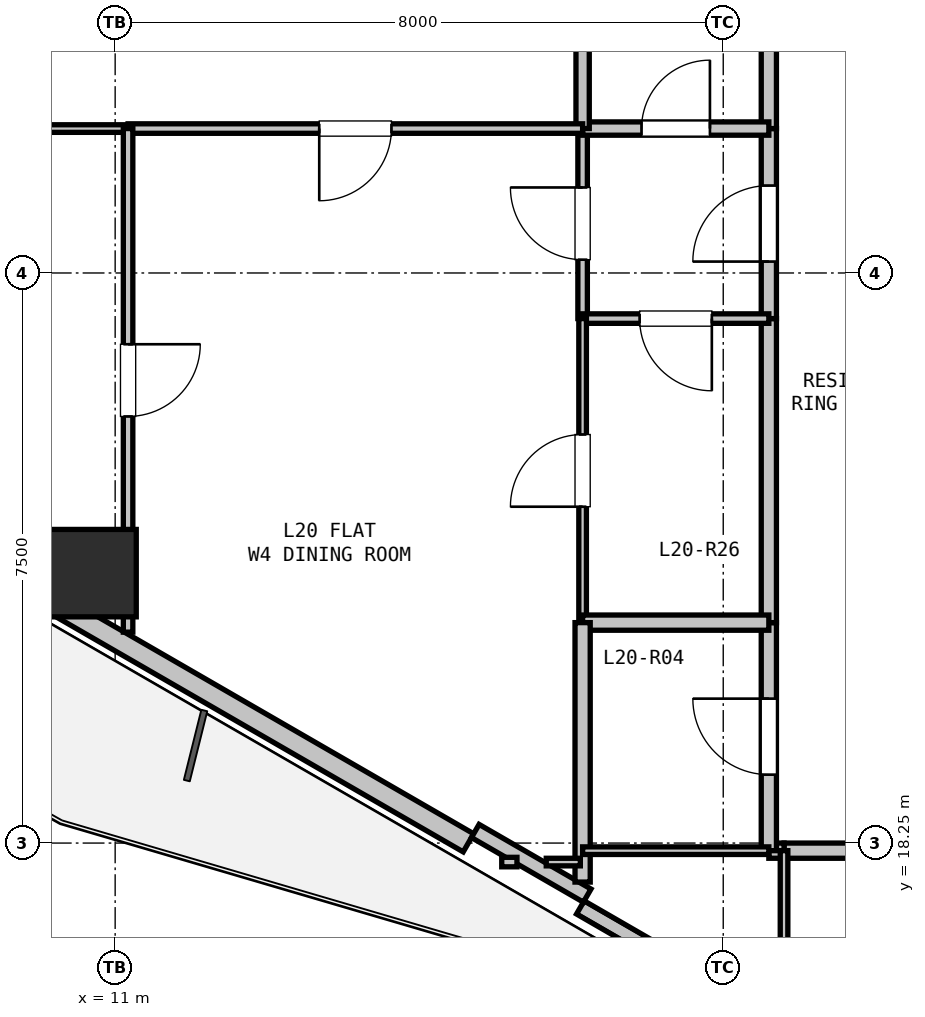
"""IFC4 building model, lengths in metres.
Left out: names, types, materials, properties, quantities, classifications, styles, units other than length and angle.
Written with IfcOpenShell. Run it as: python <this file> out.ifc"""

import sys

from ifc_helpers import new_model, si_unit, direction, frame, frame_2d, origin, origin_2d, place, context, subcontext, project, spatial, rectangle, hollow_rectangle, extrude, element, fill, save


model = new_model("IFC4")
c1 = context("Model", 3, precision=1e-05, world=origin(), true_north=direction((0.0, 1.0)))
c2 = subcontext(c1, "Body", "Model", "MODEL_VIEW")
j1 = project(units=[si_unit("LENGTHUNIT", "METRE"), si_unit("PLANEANGLEUNIT", "RADIAN")], contexts=[c1])
p1 = place(None, origin())
s1 = spatial("IfcSite", under=j1, at=p1, CompositionType="ELEMENT")
p2 = place(p1, origin())
s2 = spatial("IfcBuilding", under=s1, at=p2, CompositionType="ELEMENT")
p3 = place(p2, frame((0.0, 0.0, 76.8)))
s3 = spatial("IfcBuildingStorey", under=s2, at=p3, CompositionType="ELEMENT", Elevation=76.8)
p4 = place(p3, frame((10.702, 21.801, 0.0), z_axis=(0.0, 0.0, 1.0), x_axis=(1.0, 0.0, 0.0)))
e1 = element("IfcColumn", 1, at=p4, inside=s3, PredefinedType="COLUMN", context=c2, shape_type="SweptSolid", body=[
    extrude(hollow_rectangle(XDim=1.15, YDim=1.15, WallThickness=0.032, at=origin_2d()), origin(), (0.0, 0.0, 1.0), 3.3),
])
p5 = place(p3, frame((26.845, 11.788, 0.0), z_axis=(0.0, 0.0, 1.0), x_axis=(-0.866027010039, 0.499997217876, 0.0)))
e2 = element("IfcWall", 2, at=p5, inside=s3, PredefinedType="PARAPET", context=c2, shape_type="SweptSolid", body=[
    extrude(rectangle(XDim=11.229, YDim=0.2, at=frame_2d((5.615, 0.0))), origin(), (0.0, 0.0, 1.0), 0.2),
])
p6 = place(p3, frame((15.648, 18.253, 0.0), z_axis=(0.0, 0.0, 1.0), x_axis=(-0.866023023012, 0.500004123596, 0.0)))
e3 = element("IfcWall", 3, at=p6, inside=s3, PredefinedType="SOLIDWALL", context=c2, shape_type="SweptSolid", body=[
    extrude(rectangle(XDim=11.93, YDim=0.275, at=frame_2d((5.965, 0.0))), origin(), (0.0, 0.0, 1.0), 2.67),
])
p7 = place(p6, frame((8.021, 0.0, 0.9)))
e4 = element("IfcOpeningElement", 4, at=p7, cuts=e3, PredefinedType="OPENING", context=c2, shape_type="SweptSolid", body=[
    extrude(rectangle(XDim=1.2, YDim=1.4, at=frame_2d((0.6, 0.7))), frame((0.0, 0.147, 0.0), z_axis=(0.0, -1.0, 0.0), x_axis=(1.0, 0.0, 0.0)), (0.0, 0.0, 1.0), 0.295),
])
p8 = place(p3, frame((17.21, 17.559, 0.0), z_axis=(0.0, 0.0, 1.0), x_axis=(-0.866025371046, 0.500000056704, 0.0)))
e5 = element("IfcWall", 5, at=p8, inside=s3, PredefinedType="PARAPET", context=c2, shape_type="SweptSolid", body=[
    extrude(rectangle(XDim=1.7, YDim=0.2, at=frame_2d((0.85, 0.0))), origin(), (0.0, 0.0, 1.0), 2.67),
])
p9 = place(p3, frame((22.6, 18.15, 0.0), z_axis=(0.0, 0.0, 1.0), x_axis=(-1.0, 0.0, 0.0)))
e6 = element("IfcWall", 6, at=p9, inside=s3, PredefinedType="PARTITIONING", context=c2, shape_type="SweptSolid", body=[
    extrude(rectangle(XDim=2.8, YDim=0.2, at=frame_2d((1.4, 0.0))), origin(), (0.0, 0.0, 1.0), 3.05),
])
p10 = place(p9, frame((0.9, 0.0, 0.0)))
e7 = element("IfcOpeningElement", 7, at=p10, cuts=e6, PredefinedType="OPENING", context=c2, shape_type="SweptSolid", body=[
    extrude(rectangle(XDim=1.0, YDim=2.15, at=frame_2d((0.5, 1.075))), frame((0.0, 0.11, 0.0), z_axis=(0.0, -1.0, 0.0), x_axis=(1.0, 0.0, 0.0)), (0.0, 0.0, 1.0), 0.22),
])
p11 = place(p3, frame((19.8, 18.15, 0.0), z_axis=(0.0, 0.0, 1.0), x_axis=(-1.0, 0.0, 0.0)))
e8 = element("IfcWall", 8, at=p11, inside=s3, PredefinedType="PARTITIONING", context=c2, shape_type="SweptSolid", body=[
    extrude(rectangle(XDim=0.2, YDim=0.2, at=frame_2d((0.1, 0.0))), origin(), (0.0, 0.0, 1.0), 3.05),
])
p12 = place(p3, frame((19.6, 18.15, 0.0), z_axis=(0.0, 0.0, 1.0), x_axis=(0.0, 1.0, 0.0)))
e9 = element("IfcWall", 9, at=p12, inside=s3, PredefinedType="PARTITIONING", context=c2, shape_type="SweptSolid", body=[
    extrude(rectangle(XDim=3.0, YDim=0.2, at=frame_2d((1.5, 0.0))), origin(), (0.0, 0.0, 1.0), 2.423),
])
p13 = place(p12, frame((1.0, 0.0, 0.0)))
e10 = element("IfcOpeningElement", 10, at=p13, cuts=e9, PredefinedType="OPENING", context=c2, shape_type="SweptSolid", body=[
    extrude(rectangle(XDim=1.0, YDim=2.15, at=frame_2d((0.5, 1.075))), frame((0.0, 0.11, 0.0), z_axis=(0.0, -1.0, 0.0), x_axis=(1.0, 0.0, 0.0)), (0.0, 0.0, 1.0), 0.22),
])
p14 = place(p3, frame((19.6, 21.15, 0.0), z_axis=(0.0, 0.0, 1.0), x_axis=(0.0, 1.0, 0.0)))
e11 = element("IfcWall", 11, at=p14, inside=s3, PredefinedType="PARTITIONING", context=c2, shape_type="SweptSolid", body=[
    extrude(rectangle(XDim=4.0, YDim=0.2, at=frame_2d((2.0, 0.0))), origin(), (0.0, 0.0, 1.0), 2.423),
])
p15 = place(p3, frame((19.6, 25.15, 0.0), z_axis=(0.0, 0.0, 1.0), x_axis=(0.0, 1.0, 0.0)))
e12 = element("IfcWall", 12, at=p15, inside=s3, PredefinedType="PARTITIONING", context=c2, shape_type="SweptSolid", body=[
    extrude(rectangle(XDim=2.5, YDim=0.2, at=frame_2d((1.25, 0.0))), origin(), (0.0, 0.0, 1.0), 3.05),
])
p16 = place(p15, frame((0.75, 0.0, 0.0)))
e13 = element("IfcOpeningElement", 13, at=p16, cuts=e12, PredefinedType="OPENING", context=c2, shape_type="SweptSolid", body=[
    extrude(rectangle(XDim=1.0, YDim=2.15, at=frame_2d((0.5, 1.075))), frame((0.0, 0.11, 0.0), z_axis=(0.0, -1.0, 0.0), x_axis=(1.0, 0.0, 0.0)), (0.0, 0.0, 1.0), 0.22),
])
p17 = place(p3, frame((19.6, 27.65, 0.0), z_axis=(0.0, 0.0, 1.0), x_axis=(0.0, 1.0, 0.0)))
e14 = element("IfcWall", 14, at=p17, inside=s3, PredefinedType="PARTITIONING", context=c2, shape_type="SweptSolid", body=[
    extrude(rectangle(XDim=2.1, YDim=0.2, at=frame_2d((1.05, 0.0))), origin(), (0.0, 0.0, 1.0), 3.05),
])
p18 = place(p3, frame((17.15, 25.15, 0.0), z_axis=(0.0, 0.0, 1.0), x_axis=(0.0, 1.0, 0.0)))
e15 = element("IfcWall", 15, at=p18, inside=s3, PredefinedType="PARTITIONING", context=c2, shape_type="SweptSolid", body=[
    extrude(rectangle(XDim=2.5, YDim=0.125, at=frame_2d((1.25, 0.0))), origin(), (0.0, 0.0, 1.0), 3.05),
])
p19 = place(p18, frame((0.775, 0.0, 0.0)))
e16 = element("IfcOpeningElement", 16, at=p19, cuts=e15, PredefinedType="OPENING", context=c2, shape_type="SweptSolid", body=[
    extrude(rectangle(XDim=0.95, YDim=2.1, at=frame_2d((0.475, 1.05))), frame((0.0, 0.073, 0.0), z_axis=(0.0, -1.0, 0.0), x_axis=(1.0, 0.0, 0.0)), (0.0, 0.0, 1.0), 0.145),
])
p20 = place(p3, frame((17.15, 27.65, 0.0), z_axis=(0.0, 0.0, 1.0), x_axis=(1.0, 0.0, 0.0)))
e17 = element("IfcWall", 17, at=p20, inside=s3, PredefinedType="PLUMBINGWALL", context=c2, shape_type="SweptSolid", body=[
    extrude(rectangle(XDim=2.45, YDim=0.175, at=frame_2d((1.225, 0.0))), origin(), (0.0, 0.0, 1.0), 3.05),
])
p21 = place(p20, frame((0.775, 0.0, 0.0)))
e18 = element("IfcOpeningElement", 18, at=p21, cuts=e17, PredefinedType="OPENING", context=c2, shape_type="SweptSolid", body=[
    extrude(rectangle(XDim=0.9, YDim=2.1, at=frame_2d((0.45, 1.05))), frame((0.0, 0.097, 0.0), z_axis=(0.0, -1.0, 0.0), x_axis=(1.0, 0.0, 0.0)), (0.0, 0.0, 1.0), 0.195),
])
p22 = place(p3, frame((19.6, 25.15, 0.0), z_axis=(0.0, 0.0, 1.0), x_axis=(-1.0, 0.0, 0.0)))
e19 = element("IfcWall", 19, at=p22, inside=s3, PredefinedType="PARTITIONING", context=c2, shape_type="SweptSolid", body=[
    extrude(rectangle(XDim=2.45, YDim=0.125, at=frame_2d((1.225, 0.0))), origin(), (0.0, 0.0, 1.0), 3.05),
])
p23 = place(p22, frame((0.75, 0.0, 0.0)))
e20 = element("IfcOpeningElement", 20, at=p23, cuts=e19, PredefinedType="OPENING", context=c2, shape_type="SweptSolid", body=[
    extrude(rectangle(XDim=0.95, YDim=2.1, at=frame_2d((0.475, 1.05))), frame((0.0, 0.073, 0.0), z_axis=(0.0, -1.0, 0.0), x_axis=(1.0, 0.0, 0.0)), (0.0, 0.0, 1.0), 0.145),
])
p24 = place(p3, frame((17.15, 27.65, 0.0), z_axis=(0.0, 0.0, 1.0), x_axis=(0.0, 1.0, 0.0)))
e21 = element("IfcWall", 21, at=p24, inside=s3, PredefinedType="PLUMBINGWALL", context=c2, shape_type="SweptSolid", body=[
    extrude(rectangle(XDim=2.1, YDim=0.175, at=frame_2d((1.05, 0.0))), origin(), (0.0, 0.0, 1.0), 3.05),
])
p25 = place(p3, frame((17.15, 21.15, 0.0), z_axis=(0.0, 0.0, 1.0), x_axis=(0.0, 1.0, 0.0)))
e22 = element("IfcWall", 22, at=p25, inside=s3, PredefinedType="PARTITIONING", context=c2, shape_type="SweptSolid", body=[
    extrude(rectangle(XDim=4.0, YDim=0.1, at=frame_2d((2.0, 0.0))), origin(), (0.0, 0.0, 1.0), 2.423),
])
p26 = place(p25, frame((1.525, 0.0, 0.0)))
e23 = element("IfcOpeningElement", 23, at=p26, cuts=e22, PredefinedType="OPENING", context=c2, shape_type="SweptSolid", body=[
    extrude(rectangle(XDim=0.95, YDim=2.1, at=frame_2d((0.475, 1.05))), frame((0.0, 0.06, 0.0), z_axis=(0.0, -1.0, 0.0), x_axis=(1.0, 0.0, 0.0)), (0.0, 0.0, 1.0), 0.12),
])
p27 = place(p3, frame((19.6, 21.15, 0.0), z_axis=(0.0, 0.0, 1.0), x_axis=(-1.0, 0.0, 0.0)))
e24 = element("IfcWall", 24, at=p27, inside=s3, PredefinedType="PARTITIONING", context=c2, shape_type="SweptSolid", body=[
    extrude(rectangle(XDim=2.45, YDim=0.2, at=frame_2d((1.225, 0.0))), origin(), (0.0, 0.0, 1.0), 2.423),
])
p28 = place(p3, frame((17.15, 17.737, 0.0), z_axis=(0.0, 0.0, 1.0), x_axis=(0.0, 1.0, 0.0)))
e25 = element("IfcWall", 25, at=p28, inside=s3, PredefinedType="PARTITIONING", context=c2, shape_type="SweptSolid", body=[
    extrude(rectangle(XDim=3.413, YDim=0.2, at=frame_2d((1.707, 0.0))), origin(), (0.0, 0.0, 1.0), 2.365),
])
p29 = place(p3, frame((19.6, 18.15, 0.0), z_axis=(0.0, 0.0, 1.0), x_axis=(-1.0, 0.0, 0.0)))
e26 = element("IfcWall", 26, at=p29, inside=s3, PredefinedType="PARTITIONING", context=c2, shape_type="SweptSolid", body=[
    extrude(rectangle(XDim=2.45, YDim=0.1, at=frame_2d((1.225, 0.0))), origin(), (0.0, 0.0, 1.0), 2.365),
])
p30 = place(p3, frame((19.8, 15.897, 0.0), z_axis=(0.0, 0.0, 1.0), x_axis=(0.0, 1.0, 0.0)))
e27 = element("IfcWall", 27, at=p30, inside=s3, PredefinedType="PARTITIONING", context=c2, shape_type="SweptSolid", body=[
    extrude(rectangle(XDim=2.252, YDim=0.1, at=frame_2d((1.126, 0.0))), origin(), (0.0, 0.0, 1.0), 2.365),
])
p31 = place(p3, frame((17.15, 27.65, 0.0), z_axis=(0.0, 0.0, 1.0), x_axis=(-1.0, 0.0, 0.0)))
e28 = element("IfcWall", 28, at=p31, inside=s3, PredefinedType="PARTITIONING", context=c2, shape_type="SweptSolid", body=[
    extrude(rectangle(XDim=5.98, YDim=0.125, at=frame_2d((2.99, 0.0))), origin(), (0.0, 0.0, 1.0), 3.05),
])
p32 = place(p31, frame((2.515, 0.0, 0.0)))
e29 = element("IfcOpeningElement", 29, at=p32, cuts=e28, PredefinedType="OPENING", context=c2, shape_type="SweptSolid", body=[
    extrude(rectangle(XDim=0.95, YDim=2.1, at=frame_2d((0.475, 1.05))), frame((0.0, 0.073, 0.0), z_axis=(0.0, -1.0, 0.0), x_axis=(1.0, 0.0, 0.0)), (0.0, 0.0, 1.0), 0.145),
])
p33 = place(p3, frame((11.17, 27.65, 0.0), z_axis=(0.0, 0.0, 1.0), x_axis=(-1.0, 0.0, 0.0)))
e30 = element("IfcWall", 30, at=p33, inside=s3, PredefinedType="PARTITIONING", context=c2, shape_type="SweptSolid", body=[
    extrude(rectangle(XDim=5.822, YDim=0.1, at=frame_2d((2.911, 0.0))), origin(), (0.0, 0.0, 1.0), 2.66),
])
p34 = place(p33, frame((2.436, 0.0, 0.0)))
e31 = element("IfcOpeningElement", 31, at=p34, cuts=e30, PredefinedType="OPENING", context=c2, shape_type="SweptSolid", body=[
    extrude(rectangle(XDim=0.95, YDim=2.1, at=frame_2d((0.475, 1.05))), frame((0.0, 0.06, 0.0), z_axis=(0.0, -1.0, 0.0), x_axis=(1.0, 0.0, 0.0)), (0.0, 0.0, 1.0), 0.12),
])
p35 = place(p3, frame((11.17, 27.65, 0.0), z_axis=(0.0, 0.0, 1.0), x_axis=(0.0, -1.0, 0.0)))
e32 = element("IfcWall", 32, at=p35, inside=s3, PredefinedType="PARTITIONING", context=c2, shape_type="SweptSolid", body=[
    extrude(rectangle(XDim=6.625, YDim=0.125, at=frame_2d((3.312, 0.0))), origin(), (0.0, 0.0, 1.0), 2.365),
])
p36 = place(p35, frame((2.838, 0.0, 0.0)))
e33 = element("IfcOpeningElement", 33, at=p36, cuts=e32, PredefinedType="OPENING", context=c2, shape_type="SweptSolid", body=[
    extrude(rectangle(XDim=0.95, YDim=2.1, at=frame_2d((0.475, 1.05))), frame((0.0, 0.073, 0.0), z_axis=(0.0, -1.0, 0.0), x_axis=(1.0, 0.0, 0.0)), (0.0, 0.0, 1.0), 0.145),
])
p37 = place(p3, frame((17.12, 18.0, 0.0), z_axis=(0.0, 0.0, 1.0), x_axis=(-1.0, 0.0, 0.0)))
e34 = element("IfcWall", 34, at=p37, inside=s3, PredefinedType="PARTITIONING", context=c2, shape_type="SweptSolid", body=[
    extrude(rectangle(XDim=0.448, YDim=0.1, at=frame_2d((0.224, 0.0))), origin(), (0.0, 0.0, 1.0), 2.365),
])
p38 = place(p3, frame((16.286, 18.0, 0.0), z_axis=(0.0, 0.0, 1.0), x_axis=(-1.0, 0.0, 0.0)))
e35 = element("IfcWall", 35, at=p38, inside=s3, PredefinedType="PARTITIONING", context=c2, shape_type="SweptSolid", body=[
    extrude(rectangle(XDim=0.2, YDim=0.125, at=frame_2d((0.1, 0.0))), origin(), (0.0, 0.0, 1.0), 3.05),
])
p39 = place(p16, origin())
e36 = element("IfcDoor", 36, at=p39, inside=s3, OperationType="SINGLE_SWING_LEFT", PredefinedType="DOOR", context=c2, shape_type="SweptSolid", body=[
    extrude(rectangle(XDim=1.0, YDim=2.15, at=frame_2d((0.5, 1.075))), frame((0.0, 0.025, 0.0), z_axis=(0.0, -1.0, 0.0), x_axis=(1.0, 0.0, 0.0)), (0.0, 0.0, 1.0), 0.05),
])
fill(e13, e36)
p40 = place(p13, origin())
e37 = element("IfcDoor", 37, at=p40, inside=s3, OperationType="SINGLE_SWING_RIGHT", PredefinedType="DOOR", context=c2, shape_type="SweptSolid", body=[
    extrude(rectangle(XDim=1.0, YDim=2.15, at=frame_2d((0.5, 1.075))), frame((0.0, 0.025, 0.0), z_axis=(0.0, -1.0, 0.0), x_axis=(1.0, 0.0, 0.0)), (0.0, 0.0, 1.0), 0.05),
])
fill(e10, e37)
p41 = place(p21, origin())
e38 = element("IfcDoor", 38, at=p41, inside=s3, OperationType="SINGLE_SWING_RIGHT", PredefinedType="DOOR", context=c2, shape_type="SweptSolid", body=[
    extrude(rectangle(XDim=0.9, YDim=2.1, at=frame_2d((0.45, 1.05))), frame((0.0, 0.025, 0.0), z_axis=(0.0, -1.0, 0.0), x_axis=(1.0, 0.0, 0.0)), (0.0, 0.0, 1.0), 0.05),
])
fill(e18, e38)
p42 = place(p23, origin())
e39 = element("IfcDoor", 39, at=p42, inside=s3, OperationType="SINGLE_SWING_LEFT", PredefinedType="DOOR", context=c2, shape_type="SweptSolid", body=[
    extrude(rectangle(XDim=0.95, YDim=2.1, at=frame_2d((0.475, 1.05))), frame((0.0, 0.025, 0.0), z_axis=(0.0, -1.0, 0.0), x_axis=(1.0, 0.0, 0.0)), (0.0, 0.0, 1.0), 0.05),
])
fill(e20, e39)
p43 = place(p19, origin())
e40 = element("IfcDoor", 40, at=p43, inside=s3, OperationType="SINGLE_SWING_RIGHT", PredefinedType="DOOR", context=c2, shape_type="SweptSolid", body=[
    extrude(rectangle(XDim=0.95, YDim=2.1, at=frame_2d((0.475, 1.05))), frame((0.0, 0.025, 0.0), z_axis=(0.0, -1.0, 0.0), x_axis=(1.0, 0.0, 0.0)), (0.0, 0.0, 1.0), 0.05),
])
fill(e16, e40)
p44 = place(p26, origin())
e41 = element("IfcDoor", 41, at=p44, inside=s3, OperationType="SINGLE_SWING_LEFT", PredefinedType="DOOR", context=c2, shape_type="SweptSolid", body=[
    extrude(rectangle(XDim=0.95, YDim=2.1, at=frame_2d((0.475, 1.05))), frame((0.0, 0.025, 0.0), z_axis=(0.0, -1.0, 0.0), x_axis=(1.0, 0.0, 0.0)), (0.0, 0.0, 1.0), 0.05),
])
fill(e23, e41)
p45 = place(p32, origin())
e42 = element("IfcDoor", 42, at=p45, inside=s3, OperationType="SINGLE_SWING_RIGHT", PredefinedType="DOOR", context=c2, shape_type="SweptSolid", body=[
    extrude(rectangle(XDim=0.95, YDim=2.1, at=frame_2d((0.475, 1.05))), frame((0.0, 0.025, 0.0), z_axis=(0.0, -1.0, 0.0), x_axis=(1.0, 0.0, 0.0)), (0.0, 0.0, 1.0), 0.05),
])
fill(e29, e42)
p46 = place(p36, origin())
e43 = element("IfcDoor", 43, at=p46, inside=s3, OperationType="SINGLE_SWING_LEFT", PredefinedType="DOOR", context=c2, shape_type="SweptSolid", body=[
    extrude(rectangle(XDim=0.95, YDim=2.1, at=frame_2d((0.475, 1.05))), frame((0.0, 0.025, 0.0), z_axis=(0.0, -1.0, 0.0), x_axis=(1.0, 0.0, 0.0)), (0.0, 0.0, 1.0), 0.05),
])
fill(e33, e43)
save(model, sys.argv[1])
